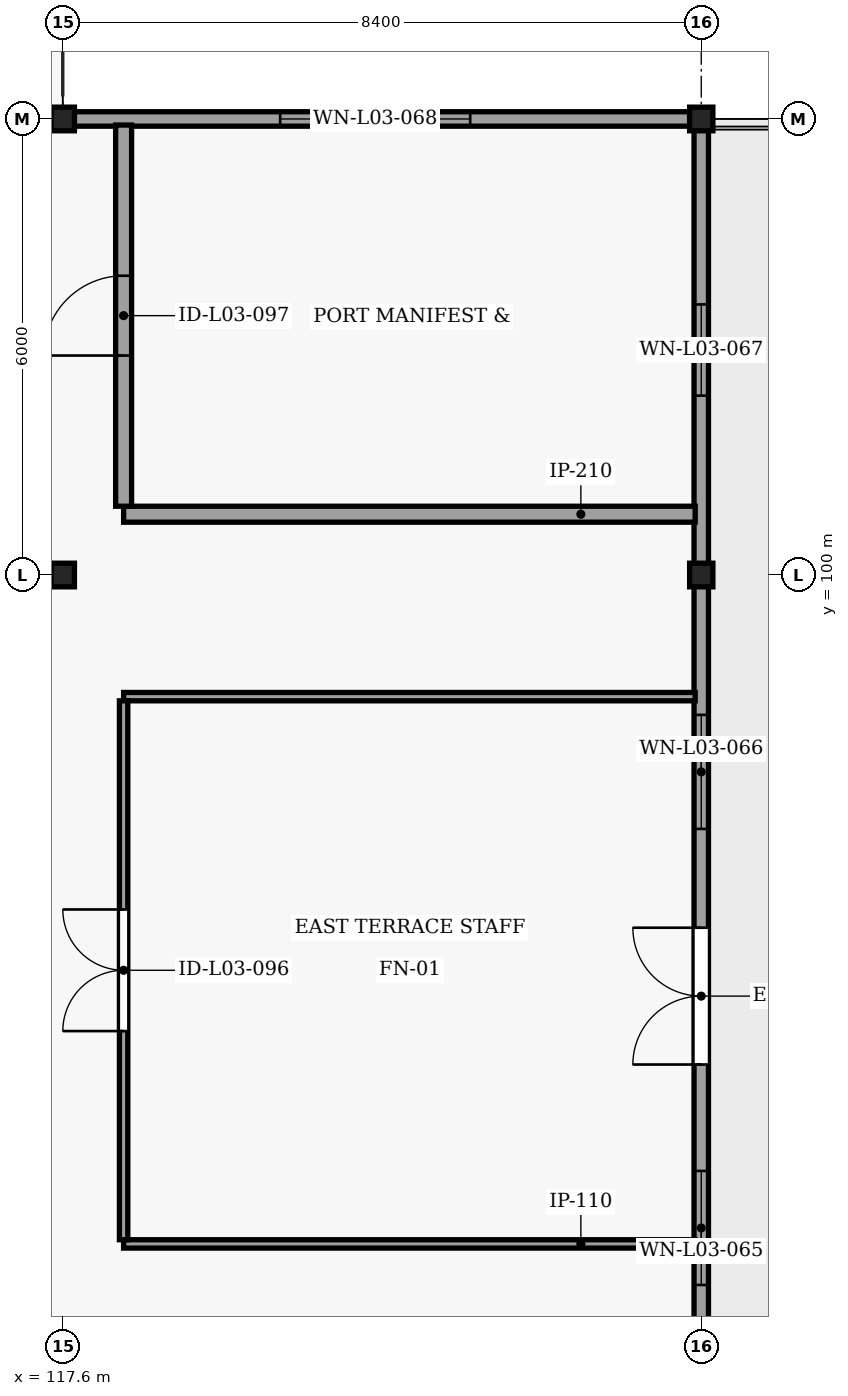
"""IFC4 building model, lengths in metres.
Left out: names, types, materials, properties, quantities, classifications, styles, units other than length and angle.
Written with IfcOpenShell. Run it as: python <this file> out.ifc"""

import sys

from ifc_helpers import new_model, si_unit, direction, frame, frame_2d, origin, origin_2d, place, context, subcontext, project, spatial, rectangle, i_section, extrude, element, fill, save


model = new_model("IFC4")
c1 = context("Model", 3, precision=1e-05, world=origin(), true_north=direction((0.0, 1.0)))
c2 = subcontext(c1, "Body", "Model", "MODEL_VIEW")
j1 = project(units=[si_unit("LENGTHUNIT", "METRE"), si_unit("PLANEANGLEUNIT", "RADIAN")], contexts=[c1])
p1 = place(None, origin())
s1 = spatial("IfcSite", under=j1, at=p1, CompositionType="ELEMENT")
p2 = place(p1, origin())
s2 = spatial("IfcBuilding", under=s1, at=p2, CompositionType="ELEMENT")
p3 = place(p2, frame((0.0, 0.0, 10.2)))
s3 = spatial("IfcBuildingStorey", under=s2, at=p3, CompositionType="ELEMENT", Elevation=10.2)
for number, where, z_axis, x_axis in (
    (1, (117.6, 100.0, 0.0), (0.0, 0.0, 1.0), (1.0, 0.0, 0.0)),
    (2, (126.0, 100.0, 0.0), (0.0, 0.0, 1.0), (1.0, 0.0, 0.0)),
    (3, (117.6, 106.0, 0.0), (0.0, 0.0, 1.0), (1.0, 0.0, 0.0)),
    (4, (126.0, 106.0, 0.0), (0.0, 0.0, 1.0), (1.0, 0.0, 0.0)),
):
    element("IfcColumn", number, at=place(p3, frame(where, z_axis=z_axis, x_axis=x_axis)), inside=s3, PredefinedType="COLUMN", context=c2, shape_type="SweptSolid", body=[
        extrude(i_section(OverallWidth=0.306, OverallDepth=0.311, WebThickness=0.011, FlangeThickness=0.017, FilletRadius=0.015, at=origin_2d()), origin(), (0.0, 0.0, 1.0), 3.92),
    ])
p4 = place(p3, frame((126.0, 89.14, 0.0), z_axis=(0.0, 0.0, 1.0), x_axis=(0.0, 1.0, 0.0)))
e5 = element("IfcWall", 5, at=p4, inside=s3, PredefinedType="SOLIDWALL", context=c2, shape_type="SweptSolid", body=[
    extrude(rectangle(XDim=11.012, YDim=0.19, at=frame_2d((5.506, 0.0))), origin(), (0.0, 0.0, 1.0), 3.508),
])
p5 = place(p4, frame((4.419, 0.0, 0.0)))
e6 = element("IfcOpeningElement", 6, at=p5, cuts=e5, PredefinedType="OPENING", context=c2, shape_type="SweptSolid", body=[
    extrude(rectangle(XDim=1.8, YDim=2.25, at=frame_2d((0.9, 1.125))), frame((0.0, 0.105, 0.0), z_axis=(0.0, -1.0, 0.0), x_axis=(1.0, 0.0, 0.0)), (0.0, 0.0, 1.0), 0.21),
])
p6 = place(p4, frame((1.52, 0.0, 0.95)))
e7 = element("IfcOpeningElement", 7, at=p6, cuts=e5, PredefinedType="OPENING", context=c2, shape_type="SweptSolid", body=[
    extrude(rectangle(XDim=1.5, YDim=1.5, at=frame_2d((0.75, 0.75))), frame((0.0, 0.105, 0.0), z_axis=(0.0, -1.0, 0.0), x_axis=(1.0, 0.0, 0.0)), (0.0, 0.0, 1.0), 0.21),
])
p7 = place(p4, frame((7.52, 0.0, 0.95)))
e8 = element("IfcOpeningElement", 8, at=p7, cuts=e5, PredefinedType="OPENING", context=c2, shape_type="SweptSolid", body=[
    extrude(rectangle(XDim=1.5, YDim=1.5, at=frame_2d((0.75, 0.75))), frame((0.0, 0.105, 0.0), z_axis=(0.0, -1.0, 0.0), x_axis=(1.0, 0.0, 0.0)), (0.0, 0.0, 1.0), 0.21),
])
p8 = place(p3, frame((126.0, 100.14, 0.0), z_axis=(0.0, 0.0, 1.0), x_axis=(0.0, 1.0, 0.0)))
e9 = element("IfcWall", 9, at=p8, inside=s3, PredefinedType="SOLIDWALL", context=c2, shape_type="SweptSolid", body=[
    extrude(rectangle(XDim=5.719, YDim=0.19, at=frame_2d((2.86, 0.0))), origin(), (0.0, 0.0, 1.0), 3.508),
])
p9 = place(p8, frame((2.219, 0.0, 1.1)))
e10 = element("IfcOpeningElement", 10, at=p9, cuts=e9, PredefinedType="OPENING", context=c2, shape_type="SweptSolid", body=[
    extrude(rectangle(XDim=1.2, YDim=1.4, at=frame_2d((0.6, 0.7))), frame((0.0, 0.105, 0.0), z_axis=(0.0, -1.0, 0.0), x_axis=(1.0, 0.0, 0.0)), (0.0, 0.0, 1.0), 0.21),
])
p10 = place(p3, frame((117.738, 106.0, 0.0), z_axis=(0.0, 0.0, 1.0), x_axis=(1.0, 0.0, 0.0)))
e11 = element("IfcWall", 11, at=p10, inside=s3, PredefinedType="SOLIDWALL", context=c2, shape_type="SweptSolid", body=[
    extrude(rectangle(XDim=8.124, YDim=0.19, at=frame_2d((4.062, 0.0))), origin(), (0.0, 0.0, 1.0), 3.501),
])
p11 = place(p10, frame((2.722, 0.0, 0.95)))
e12 = element("IfcOpeningElement", 12, at=p11, cuts=e11, PredefinedType="OPENING", context=c2, shape_type="SweptSolid", body=[
    extrude(rectangle(XDim=2.5, YDim=1.5, at=frame_2d((1.25, 0.75))), frame((0.0, 0.105, 0.0), z_axis=(0.0, -1.0, 0.0), x_axis=(1.0, 0.0, 0.0)), (0.0, 0.0, 1.0), 0.21),
])
for number, where, z_axis, x_axis in (
    (13, (118.4, 91.2, 0.0), (0.0, 0.0, 1.0), (1.0, 0.0, 0.0)),
    (14, (118.4, 98.4, 0.0), (0.0, 0.0, 1.0), (1.0, 0.0, 0.0)),
):
    element("IfcWall", number, at=place(p3, frame(where, z_axis=z_axis, x_axis=x_axis)), inside=s3, PredefinedType="MOVABLE", context=c2, shape_type="SweptSolid", body=[
        extrude(rectangle(XDim=7.52, YDim=0.11, at=frame_2d((3.76, 0.0))), origin(), (0.0, 0.0, 1.0), 3.9),
    ])
p12 = place(p3, frame((118.4, 91.255, 0.0), z_axis=(0.0, 0.0, 1.0), x_axis=(0.0, 1.0, 0.0)))
e15 = element("IfcWall", 15, at=p12, inside=s3, PredefinedType="MOVABLE", context=c2, shape_type="SweptSolid", body=[
    extrude(rectangle(XDim=7.09, YDim=0.11, at=frame_2d((3.545, 0.0))), origin(), (0.0, 0.0, 1.0), 3.607),
])
p13 = place(p12, frame((2.745, 0.0, 0.0)))
e16 = element("IfcOpeningElement", 16, at=p13, cuts=e15, PredefinedType="OPENING", context=c2, shape_type="SweptSolid", body=[
    extrude(rectangle(XDim=1.6, YDim=2.2, at=frame_2d((0.8, 1.1))), frame((0.0, 0.065, 0.0), z_axis=(0.0, -1.0, 0.0), x_axis=(1.0, 0.0, 0.0)), (0.0, 0.0, 1.0), 0.13),
])
p14 = place(p3, frame((118.4, 100.8, 0.0), z_axis=(0.0, 0.0, 1.0), x_axis=(1.0, 0.0, 0.0)))
e17 = element("IfcWall", 17, at=p14, inside=s3, PredefinedType="SOLIDWALL", context=c2, shape_type="SweptSolid", body=[
    extrude(rectangle(XDim=7.52, YDim=0.21, at=frame_2d((3.76, 0.0))), origin(), (0.0, 0.0, 1.0), 3.9),
])
p15 = place(p3, frame((118.4, 100.905, 0.0), z_axis=(0.0, 0.0, 1.0), x_axis=(0.0, 1.0, 0.0)))
e18 = element("IfcWall", 18, at=p15, inside=s3, PredefinedType="SOLIDWALL", context=c2, shape_type="SweptSolid", body=[
    extrude(rectangle(XDim=5.015, YDim=0.21, at=frame_2d((2.507, 0.0))), origin(), (0.0, 0.0, 1.0), 3.607),
])
p16 = place(p15, frame((1.982, 0.0, 0.0)))
e19 = element("IfcOpeningElement", 19, at=p16, cuts=e18, PredefinedType="OPENING", context=c2, shape_type="SweptSolid", body=[
    extrude(rectangle(XDim=1.05, YDim=2.15, at=frame_2d((0.525, 1.075))), frame((0.0, 0.115, 0.0), z_axis=(0.0, -1.0, 0.0), x_axis=(1.0, 0.0, 0.0)), (0.0, 0.0, 1.0), 0.23),
])
p17 = place(p3, frame((103.8, 106.0, 0.0), z_axis=(0.0, 0.0, 1.0), x_axis=(1.0, 0.0, 0.0)))
e20 = element("IfcWall", 20, at=p17, inside=s3, PredefinedType="PARTITIONING", context=c2, shape_type="SweptSolid", body=[
    extrude(rectangle(XDim=13.72, YDim=0.15, at=frame_2d((6.86, 0.0))), origin(), (0.0, 0.0, 1.0), 3.433),
])
p18 = place(p17, frame((5.96, 0.0, 0.0)))
e21 = element("IfcOpeningElement", 21, at=p18, cuts=e20, PredefinedType="OPENING", context=c2, shape_type="SweptSolid", body=[
    extrude(rectangle(XDim=1.8, YDim=2.3, at=frame_2d((0.9, 1.15))), frame((0.0, 0.085, 0.0), z_axis=(0.0, -1.0, 0.0), x_axis=(1.0, 0.0, 0.0)), (0.0, 0.0, 1.0), 0.17),
])
p19 = place(p5, origin())
e22 = element("IfcDoor", 22, at=p19, inside=s3, OperationType="DOUBLE_DOOR_SINGLE_SWING", PredefinedType="DOOR", context=c2, shape_type="SweptSolid", body=[
    extrude(rectangle(XDim=1.8, YDim=2.25, at=frame_2d((0.9, 1.125))), frame((0.0, 0.025, 0.0), z_axis=(0.0, -1.0, 0.0), x_axis=(1.0, 0.0, 0.0)), (0.0, 0.0, 1.0), 0.05),
])
fill(e6, e22)
p20 = place(p6, origin())
e23 = element("IfcWindow", 23, at=p20, inside=s3, PartitioningType="SINGLE_PANEL", PredefinedType="WINDOW", context=c2, shape_type="SweptSolid", body=[
    extrude(rectangle(XDim=1.5, YDim=1.5, at=frame_2d((0.75, 0.75))), frame((0.0, 0.03, 0.0), z_axis=(0.0, -1.0, 0.0), x_axis=(1.0, 0.0, 0.0)), (0.0, 0.0, 1.0), 0.06),
])
fill(e7, e23)
p21 = place(p7, origin())
e24 = element("IfcWindow", 24, at=p21, inside=s3, PartitioningType="SINGLE_PANEL", PredefinedType="WINDOW", context=c2, shape_type="SweptSolid", body=[
    extrude(rectangle(XDim=1.5, YDim=1.5, at=frame_2d((0.75, 0.75))), frame((0.0, 0.03, 0.0), z_axis=(0.0, -1.0, 0.0), x_axis=(1.0, 0.0, 0.0)), (0.0, 0.0, 1.0), 0.06),
])
fill(e8, e24)
p22 = place(p9, origin())
e25 = element("IfcWindow", 25, at=p22, inside=s3, PartitioningType="SINGLE_PANEL", PredefinedType="WINDOW", context=c2, shape_type="SweptSolid", body=[
    extrude(rectangle(XDim=1.2, YDim=1.4, at=frame_2d((0.6, 0.7))), frame((0.0, 0.03, 0.0), z_axis=(0.0, -1.0, 0.0), x_axis=(1.0, 0.0, 0.0)), (0.0, 0.0, 1.0), 0.06),
])
fill(e10, e25)
p23 = place(p11, origin())
e26 = element("IfcWindow", 26, at=p23, inside=s3, PartitioningType="SINGLE_PANEL", PredefinedType="WINDOW", context=c2, shape_type="SweptSolid", body=[
    extrude(rectangle(XDim=2.5, YDim=1.5, at=frame_2d((1.25, 0.75))), frame((0.0, 0.03, 0.0), z_axis=(0.0, -1.0, 0.0), x_axis=(1.0, 0.0, 0.0)), (0.0, 0.0, 1.0), 0.06),
])
fill(e12, e26)
p24 = place(p13, origin())
e27 = element("IfcDoor", 27, at=p24, inside=s3, OperationType="DOUBLE_DOOR_SINGLE_SWING", PredefinedType="DOOR", context=c2, shape_type="SweptSolid", body=[
    extrude(rectangle(XDim=1.6, YDim=2.2, at=frame_2d((0.8, 1.1))), frame((0.0, 0.025, 0.0), z_axis=(0.0, -1.0, 0.0), x_axis=(1.0, 0.0, 0.0)), (0.0, 0.0, 1.0), 0.05),
])
fill(e16, e27)
p25 = place(p16, origin())
e28 = element("IfcDoor", 28, at=p25, inside=s3, OperationType="SINGLE_SWING_LEFT", PredefinedType="DOOR", context=c2, shape_type="SweptSolid", body=[
    extrude(rectangle(XDim=1.05, YDim=2.15, at=frame_2d((0.525, 1.075))), frame((0.0, 0.025, 0.0), z_axis=(0.0, -1.0, 0.0), x_axis=(1.0, 0.0, 0.0)), (0.0, 0.0, 1.0), 0.05),
])
fill(e19, e28)
save(model, sys.argv[1])
